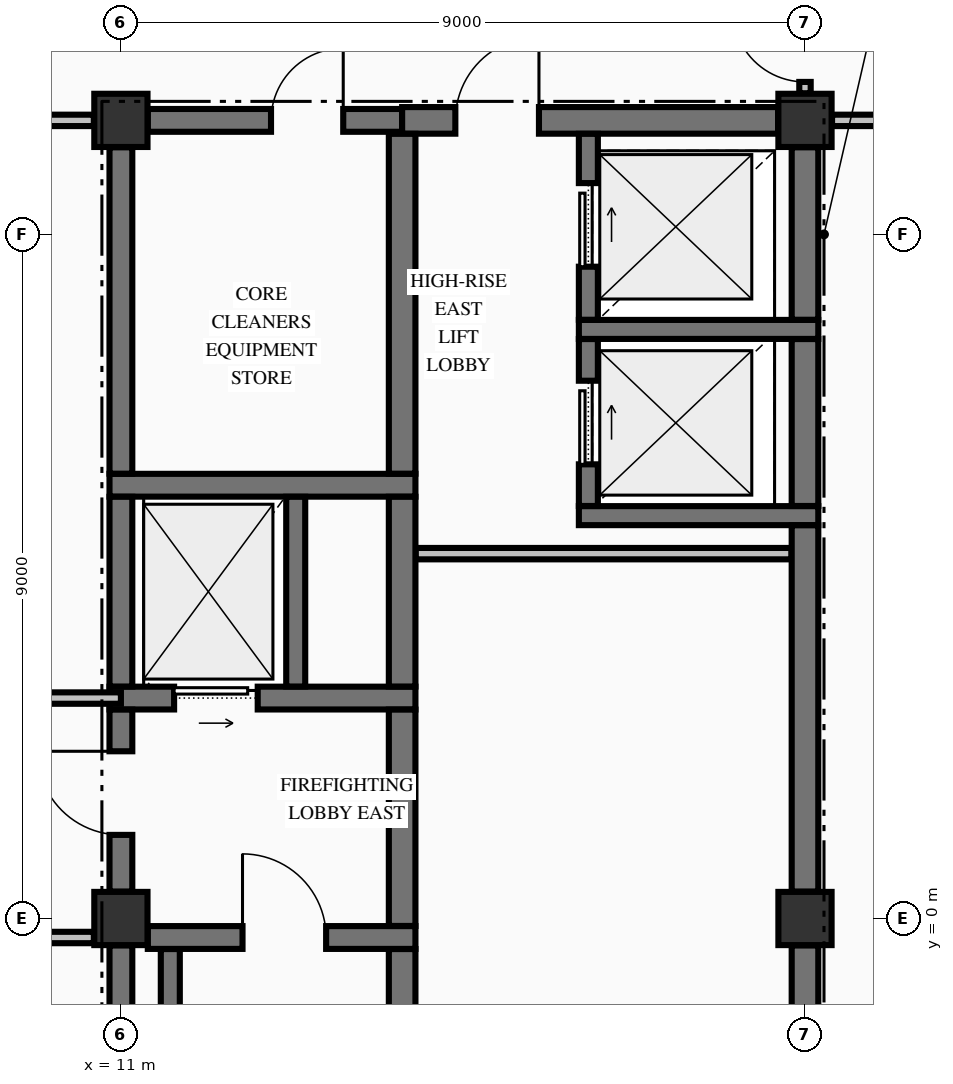
"""IFC4 building model, lengths in metres.
Left out: names, types, materials, properties, quantities, classifications, styles, units other than length and angle.
Written with IfcOpenShell. Run it as: python <this file> out.ifc"""

import sys

from ifc_helpers import new_model, si_unit, direction, frame, frame_2d, origin, origin_2d, place, context, subcontext, project, spatial, rectangle, extrude, element, fill, save


model = new_model("IFC4")
c1 = context("Model", 3, precision=1e-05, world=origin(), true_north=direction((0.0, 1.0)))
c2 = subcontext(c1, "Body", "Model", "MODEL_VIEW")
j1 = project(units=[si_unit("LENGTHUNIT", "METRE"), si_unit("PLANEANGLEUNIT", "RADIAN")], contexts=[c1])
p1 = place(None, origin())
s1 = spatial("IfcSite", under=j1, at=p1, CompositionType="ELEMENT")
p2 = place(p1, origin())
s2 = spatial("IfcBuilding", under=s1, at=p2, CompositionType="ELEMENT")
p3 = place(p2, frame((0.0, 0.0, 249.43)))
s3 = spatial("IfcBuildingStorey", under=s2, at=p3, CompositionType="ELEMENT", Elevation=249.43)
for number, where, z_axis, x_axis in (
    (1, (11.0, 0.0, -0.425), (0.0, 0.0, 1.0), (1.0, 0.0, 0.0)),
    (2, (11.0, 10.5, -0.425), (0.0, 0.0, 1.0), (1.0, 0.0, 0.0)),
    (3, (20.0, 10.5, -0.425), (0.0, 0.0, 1.0), (1.0, 0.0, 0.0)),
    (4, (20.0, 0.0, -0.425), (0.0, 0.0, 1.0), (1.0, 0.0, 0.0)),
):
    element("IfcColumn", number, at=place(p3, frame(where, z_axis=z_axis, x_axis=x_axis)), inside=s3, PredefinedType="COLUMN", context=c2, shape_type="SweptSolid", body=[
        extrude(rectangle(XDim=0.7, YDim=0.7, at=origin_2d()), origin(), (0.0, 0.0, 1.0), 5.0),
    ])
p4 = place(p3, frame((11.354, -0.25, 0.0), z_axis=(0.0, 0.0, 1.0), x_axis=(1.0, 0.0, 0.0)))
e5 = element("IfcWall", 5, at=p4, inside=s3, PredefinedType="SHEAR", context=c2, shape_type="SweptSolid", body=[
    extrude(rectangle(XDim=3.521, YDim=0.3, at=frame_2d((1.76, 0.0))), origin(), (0.0, 0.0, 1.0), 4.575),
])
p5 = place(p4, frame((1.246, 0.0, 0.0)))
e6 = element("IfcOpeningElement", 6, at=p5, cuts=e5, PredefinedType="OPENING", context=c2, shape_type="SweptSolid", body=[
    extrude(rectangle(XDim=1.1, YDim=2.15, at=frame_2d((0.55, 1.075))), frame((0.0, 0.16, 0.0), z_axis=(0.0, -1.0, 0.0), x_axis=(1.0, 0.0, 0.0)), (0.0, 0.0, 1.0), 0.32),
])
p6 = place(p3, frame((10.85, 2.9, 0.0), z_axis=(0.0, 0.0, 1.0), x_axis=(1.0, 0.0, 0.0)))
e7 = element("IfcWall", 7, at=p6, inside=s3, PredefinedType="SHEAR", context=c2, shape_type="SweptSolid", body=[
    extrude(rectangle(XDim=4.025, YDim=0.3, at=frame_2d((2.012, 0.0))), origin(), (0.0, 0.0, 1.0), 4.575),
])
p7 = place(p6, frame((0.85, 0.0, 0.0)))
e8 = element("IfcOpeningElement", 8, at=p7, cuts=e7, PredefinedType="OPENING", context=c2, shape_type="SweptSolid", body=[
    extrude(rectangle(XDim=1.1, YDim=2.2, at=frame_2d((0.55, 1.1))), frame((0.0, 0.16, 0.0), z_axis=(0.0, -1.0, 0.0), x_axis=(1.0, 0.0, 0.0)), (0.0, 0.0, 1.0), 0.32),
])
p8 = place(p3, frame((17.025, 5.3, 0.0), z_axis=(0.0, 0.0, 1.0), x_axis=(1.0, 0.0, 0.0)))
e9 = element("IfcWall", 9, at=p8, inside=s3, PredefinedType="SOLIDWALL", context=c2, shape_type="SweptSolid", body=[
    extrude(rectangle(XDim=3.15, YDim=0.25, at=frame_2d((1.575, 0.0))), origin(), (0.0, 0.0, 1.0), 4.575),
])
p9 = place(p3, frame((10.85, 5.7, 0.0), z_axis=(0.0, 0.0, 1.0), x_axis=(1.0, 0.0, 0.0)))
e10 = element("IfcWall", 10, at=p9, inside=s3, PredefinedType="SHEAR", context=c2, shape_type="SweptSolid", body=[
    extrude(rectangle(XDim=4.025, YDim=0.3, at=frame_2d((2.012, 0.0))), origin(), (0.0, 0.0, 1.0), 4.575),
])
p10 = place(p3, frame((17.025, 7.75, 0.0), z_axis=(0.0, 0.0, 1.0), x_axis=(1.0, 0.0, 0.0)))
e11 = element("IfcWall", 11, at=p10, inside=s3, PredefinedType="SOLIDWALL", context=c2, shape_type="SweptSolid", body=[
    extrude(rectangle(XDim=3.15, YDim=0.25, at=frame_2d((1.575, 0.0))), origin(), (0.0, 0.0, 1.0), 4.575),
])
p11 = place(p3, frame((11.354, 10.5, 0.0), z_axis=(0.0, 0.0, 1.0), x_axis=(1.0, 0.0, 0.0)))
e12 = element("IfcWall", 12, at=p11, inside=s3, PredefinedType="SHEAR", context=c2, shape_type="SweptSolid", body=[
    extrude(rectangle(XDim=3.346, YDim=0.3, at=frame_2d((1.673, 0.0))), origin(), (0.0, 0.0, 1.0), 4.575),
])
p12 = place(p11, frame((1.621, 0.0, 0.0)))
e13 = element("IfcOpeningElement", 13, at=p12, cuts=e12, PredefinedType="OPENING", context=c2, shape_type="SweptSolid", body=[
    extrude(rectangle(XDim=0.95, YDim=2.15, at=frame_2d((0.475, 1.075))), frame((0.0, 0.16, 0.0), z_axis=(0.0, -1.0, 0.0), x_axis=(1.0, 0.0, 0.0)), (0.0, 0.0, 1.0), 0.32),
])
p13 = place(p3, frame((14.7, 10.5, 0.0), z_axis=(0.0, 0.0, 1.0), x_axis=(1.0, 0.0, 0.0)))
e14 = element("IfcWall", 14, at=p13, inside=s3, PredefinedType="SHEAR", context=c2, shape_type="SweptSolid", body=[
    extrude(rectangle(XDim=4.946, YDim=0.35, at=frame_2d((2.473, 0.0))), origin(), (0.0, 0.0, 1.0), 4.575),
])
p14 = place(p13, frame((0.7, 0.0, 0.0)))
e15 = element("IfcOpeningElement", 15, at=p14, cuts=e14, PredefinedType="OPENING", context=c2, shape_type="SweptSolid", body=[
    extrude(rectangle(XDim=1.1, YDim=2.15, at=frame_2d((0.55, 1.075))), frame((0.0, 0.185, 0.0), z_axis=(0.0, -1.0, 0.0), x_axis=(1.0, 0.0, 0.0)), (0.0, 0.0, 1.0), 0.37),
])
p15 = place(p3, frame((-10.644, -0.25, 0.0), z_axis=(0.0, 0.0, 1.0), x_axis=(1.0, 0.0, 0.0)))
e16 = element("IfcWall", 16, at=p15, inside=s3, PredefinedType="PARTITIONING", context=c2, shape_type="SweptSolid", body=[
    extrude(rectangle(XDim=21.288, YDim=0.15, at=frame_2d((10.644, 0.0))), origin(), (0.0, 0.0, 1.0), 4.575),
])
p16 = place(p15, frame((13.544, 0.0, 0.0)))
e17 = element("IfcOpeningElement", 17, at=p16, cuts=e16, PredefinedType="OPENING", context=c2, shape_type="SweptSolid", body=[
    extrude(rectangle(XDim=1.1, YDim=2.15, at=frame_2d((0.55, 1.075))), frame((0.0, 0.085, 0.0), z_axis=(0.0, -1.0, 0.0), x_axis=(1.0, 0.0, 0.0)), (0.0, 0.0, 1.0), 0.17),
])
p17 = place(p15, frame((5.789, 0.0, 0.0)))
e18 = element("IfcOpeningElement", 18, at=p17, cuts=e16, PredefinedType="OPENING", context=c2, shape_type="SweptSolid", body=[
    extrude(rectangle(XDim=1.05, YDim=2.15, at=frame_2d((0.525, 1.075))), frame((0.0, 0.085, 0.0), z_axis=(0.0, -1.0, 0.0), x_axis=(1.0, 0.0, 0.0)), (0.0, 0.0, 1.0), 0.17),
])
p18 = place(p15, frame((17.949, 0.0, 0.0)))
e19 = element("IfcOpeningElement", 19, at=p18, cuts=e16, PredefinedType="OPENING", context=c2, shape_type="SweptSolid", body=[
    extrude(rectangle(XDim=0.95, YDim=2.15, at=frame_2d((0.475, 1.075))), frame((0.0, 0.085, 0.0), z_axis=(0.0, -1.0, 0.0), x_axis=(1.0, 0.0, 0.0)), (0.0, 0.0, 1.0), 0.17),
])
p19 = place(p3, frame((-11.0, 2.9, 0.0), z_axis=(0.0, 0.0, 1.0), x_axis=(1.0, 0.0, 0.0)))
e20 = element("IfcWall", 20, at=p19, inside=s3, PredefinedType="PARTITIONING", context=c2, shape_type="SweptSolid", body=[
    extrude(rectangle(XDim=22.0, YDim=0.15, at=frame_2d((11.0, 0.0))), origin(), (0.0, 0.0, 1.0), 4.575),
])
p20 = place(p19, frame((13.9, 0.0, 0.0)))
e21 = element("IfcOpeningElement", 21, at=p20, cuts=e20, PredefinedType="OPENING", context=c2, shape_type="SweptSolid", body=[
    extrude(rectangle(XDim=1.1, YDim=2.15, at=frame_2d((0.55, 1.075))), frame((0.0, 0.085, 0.0), z_axis=(0.0, -1.0, 0.0), x_axis=(1.0, 0.0, 0.0)), (0.0, 0.0, 1.0), 0.17),
])
p21 = place(p19, frame((6.145, 0.0, 0.0)))
e22 = element("IfcOpeningElement", 22, at=p21, cuts=e20, PredefinedType="OPENING", context=c2, shape_type="SweptSolid", body=[
    extrude(rectangle(XDim=1.05, YDim=2.15, at=frame_2d((0.525, 1.075))), frame((0.0, 0.085, 0.0), z_axis=(0.0, -1.0, 0.0), x_axis=(1.0, 0.0, 0.0)), (0.0, 0.0, 1.0), 0.17),
])
p22 = place(p19, frame((18.23, 0.0, 0.0)))
e23 = element("IfcOpeningElement", 23, at=p22, cuts=e20, PredefinedType="OPENING", context=c2, shape_type="SweptSolid", body=[
    extrude(rectangle(XDim=1.1, YDim=2.15, at=frame_2d((0.55, 1.075))), frame((0.0, 0.085, 0.0), z_axis=(0.0, -1.0, 0.0), x_axis=(1.0, 0.0, 0.0)), (0.0, 0.0, 1.0), 0.17),
])
p23 = place(p3, frame((14.878, 4.8, 0.0), z_axis=(0.0, 0.0, 1.0), x_axis=(1.0, 0.0, 0.0)))
e24 = element("IfcWall", 24, at=p23, inside=s3, PredefinedType="PARTITIONING", context=c2, shape_type="SweptSolid", body=[
    extrude(rectangle(XDim=4.944, YDim=0.15, at=frame_2d((2.472, 0.0))), origin(), (0.0, 0.0, 1.0), 4.575),
])
p24 = place(p3, frame((-10.644, 10.5, 0.0), z_axis=(0.0, 0.0, 1.0), x_axis=(1.0, 0.0, 0.0)))
e25 = element("IfcWall", 25, at=p24, inside=s3, PredefinedType="PARTITIONING", context=c2, shape_type="SweptSolid", body=[
    extrude(rectangle(XDim=21.288, YDim=0.15, at=frame_2d((10.644, 0.0))), origin(), (0.0, 0.0, 1.0), 4.575),
])
p25 = place(p24, frame((13.544, 0.0, 0.0)))
e26 = element("IfcOpeningElement", 26, at=p25, cuts=e25, PredefinedType="OPENING", context=c2, shape_type="SweptSolid", body=[
    extrude(rectangle(XDim=1.1, YDim=2.15, at=frame_2d((0.55, 1.075))), frame((0.0, 0.085, 0.0), z_axis=(0.0, -1.0, 0.0), x_axis=(1.0, 0.0, 0.0)), (0.0, 0.0, 1.0), 0.17),
])
p26 = place(p3, frame((20.356, 10.5, 0.0), z_axis=(0.0, 0.0, 1.0), x_axis=(1.0, 0.0, 0.0)))
e27 = element("IfcWall", 27, at=p26, inside=s3, PredefinedType="PARTITIONING", context=c2, shape_type="SweptSolid", body=[
    extrude(rectangle(XDim=5.479, YDim=0.15, at=frame_2d((2.74, 0.0))), origin(), (0.0, 0.0, 1.0), 4.575),
])
p27 = place(p26, frame((2.144, 0.0, 0.0)))
e28 = element("IfcOpeningElement", 28, at=p27, cuts=e27, PredefinedType="OPENING", context=c2, shape_type="SweptSolid", body=[
    extrude(rectangle(XDim=1.0, YDim=2.15, at=frame_2d((0.5, 1.075))), frame((0.0, 0.085, 0.0), z_axis=(0.0, -1.0, 0.0), x_axis=(1.0, 0.0, 0.0)), (0.0, 0.0, 1.0), 0.17),
])
p28 = place(p3, frame((11.0, -9.596, 0.0), z_axis=(0.0, 0.0, 1.0), x_axis=(0.0, 1.0, 0.0)))
e29 = element("IfcWall", 29, at=p28, inside=s3, PredefinedType="SHEAR", context=c2, shape_type="SweptSolid", body=[
    extrude(rectangle(XDim=9.242, YDim=0.3, at=frame_2d((4.621, 0.0))), origin(), (0.0, 0.0, 1.0), 4.575),
])
p29 = place(p3, frame((11.0, 0.354, 0.0), z_axis=(0.0, 0.0, 1.0), x_axis=(0.0, 1.0, 0.0)))
e30 = element("IfcWall", 30, at=p29, inside=s3, PredefinedType="SHEAR", context=c2, shape_type="SweptSolid", body=[
    extrude(rectangle(XDim=2.394, YDim=0.3, at=frame_2d((1.197, 0.0))), origin(), (0.0, 0.0, 1.0), 4.575),
])
p30 = place(p29, frame((0.746, 0.0, 0.0)))
e31 = element("IfcOpeningElement", 31, at=p30, cuts=e30, PredefinedType="OPENING", context=c2, shape_type="SweptSolid", body=[
    extrude(rectangle(XDim=1.1, YDim=2.15, at=frame_2d((0.55, 1.075))), frame((0.0, 0.16, 0.0), z_axis=(0.0, -1.0, 0.0), x_axis=(1.0, 0.0, 0.0)), (0.0, 0.0, 1.0), 0.32),
])
p31 = place(p3, frame((11.0, 3.052, 0.0), z_axis=(0.0, 0.0, 1.0), x_axis=(0.0, 1.0, 0.0)))
e32 = element("IfcWall", 32, at=p31, inside=s3, PredefinedType="SHEAR", context=c2, shape_type="SweptSolid", body=[
    extrude(rectangle(XDim=2.496, YDim=0.3, at=frame_2d((1.248, 0.0))), origin(), (0.0, 0.0, 1.0), 4.575),
])
p32 = place(p3, frame((11.0, 5.852, 0.0), z_axis=(0.0, 0.0, 1.0), x_axis=(0.0, 1.0, 0.0)))
e33 = element("IfcWall", 33, at=p32, inside=s3, PredefinedType="SHEAR", context=c2, shape_type="SweptSolid", body=[
    extrude(rectangle(XDim=4.294, YDim=0.3, at=frame_2d((2.147, 0.0))), origin(), (0.0, 0.0, 1.0), 4.575),
])
p33 = place(p3, frame((11.65, -9.798, 0.0), z_axis=(0.0, 0.0, 1.0), x_axis=(0.0, 1.0, 0.0)))
e34 = element("IfcWall", 34, at=p33, inside=s3, PredefinedType="SOLIDWALL", context=c2, shape_type="SweptSolid", body=[
    extrude(rectangle(XDim=9.396, YDim=0.25, at=frame_2d((4.698, 0.0))), origin(), (0.0, 0.0, 1.0), 4.575),
])
p34 = place(p3, frame((13.3, 3.052, 0.0), z_axis=(0.0, 0.0, 1.0), x_axis=(0.0, 1.0, 0.0)))
e35 = element("IfcWall", 35, at=p34, inside=s3, PredefinedType="SOLIDWALL", context=c2, shape_type="SweptSolid", body=[
    extrude(rectangle(XDim=2.496, YDim=0.25, at=frame_2d((1.248, 0.0))), origin(), (0.0, 0.0, 1.0), 4.575),
])
p35 = place(p3, frame((14.7, -9.773, 0.0), z_axis=(0.0, 0.0, 1.0), x_axis=(0.0, 1.0, 0.0)))
e36 = element("IfcWall", 36, at=p35, inside=s3, PredefinedType="SHEAR", context=c2, shape_type="SweptSolid", body=[
    extrude(rectangle(XDim=9.371, YDim=0.35, at=frame_2d((4.686, 0.0))), origin(), (0.0, 0.0, 1.0), 4.575),
])
p36 = place(p3, frame((14.7, -0.098, 0.0), z_axis=(0.0, 0.0, 1.0), x_axis=(0.0, 1.0, 0.0)))
e37 = element("IfcWall", 37, at=p36, inside=s3, PredefinedType="SHEAR", context=c2, shape_type="SweptSolid", body=[
    extrude(rectangle(XDim=2.846, YDim=0.35, at=frame_2d((1.423, 0.0))), origin(), (0.0, 0.0, 1.0), 4.575),
])
p37 = place(p3, frame((14.7, 3.052, 0.0), z_axis=(0.0, 0.0, 1.0), x_axis=(0.0, 1.0, 0.0)))
e38 = element("IfcWall", 38, at=p37, inside=s3, PredefinedType="SHEAR", context=c2, shape_type="SweptSolid", body=[
    extrude(rectangle(XDim=2.496, YDim=0.35, at=frame_2d((1.248, 0.0))), origin(), (0.0, 0.0, 1.0), 4.575),
])
p38 = place(p3, frame((14.7, 5.852, 0.0), z_axis=(0.0, 0.0, 1.0), x_axis=(0.0, 1.0, 0.0)))
e39 = element("IfcWall", 39, at=p38, inside=s3, PredefinedType="SHEAR", context=c2, shape_type="SweptSolid", body=[
    extrude(rectangle(XDim=4.471, YDim=0.35, at=frame_2d((2.235, 0.0))), origin(), (0.0, 0.0, 1.0), 4.575),
])
p39 = place(p3, frame((17.15, 5.427, 0.0), z_axis=(0.0, 0.0, 1.0), x_axis=(0.0, 1.0, 0.0)))
e40 = element("IfcWall", 40, at=p39, inside=s3, PredefinedType="SOLIDWALL", context=c2, shape_type="SweptSolid", body=[
    extrude(rectangle(XDim=2.196, YDim=0.25, at=frame_2d((1.098, 0.0))), origin(), (0.0, 0.0, 1.0), 4.575),
])
p40 = place(p39, frame((0.548, 0.0, 0.0)))
e41 = element("IfcOpeningElement", 41, at=p40, cuts=e40, PredefinedType="OPENING", context=c2, shape_type="SweptSolid", body=[
    extrude(rectangle(XDim=1.1, YDim=2.2, at=frame_2d((0.55, 1.1))), frame((0.0, 0.135, 0.0), z_axis=(0.0, -1.0, 0.0), x_axis=(1.0, 0.0, 0.0)), (0.0, 0.0, 1.0), 0.27),
])
p41 = place(p3, frame((17.15, 7.877, 0.0), z_axis=(0.0, 0.0, 1.0), x_axis=(0.0, 1.0, 0.0)))
e42 = element("IfcWall", 42, at=p41, inside=s3, PredefinedType="SOLIDWALL", context=c2, shape_type="SweptSolid", body=[
    extrude(rectangle(XDim=2.446, YDim=0.25, at=frame_2d((1.223, 0.0))), origin(), (0.0, 0.0, 1.0), 4.575),
])
p42 = place(p41, frame((0.698, 0.0, 0.0)))
e43 = element("IfcOpeningElement", 43, at=p42, cuts=e42, PredefinedType="OPENING", context=c2, shape_type="SweptSolid", body=[
    extrude(rectangle(XDim=1.1, YDim=2.2, at=frame_2d((0.55, 1.1))), frame((0.0, 0.135, 0.0), z_axis=(0.0, -1.0, 0.0), x_axis=(1.0, 0.0, 0.0)), (0.0, 0.0, 1.0), 0.27),
])
p43 = place(p3, frame((20.0, -9.596, 0.0), z_axis=(0.0, 0.0, 1.0), x_axis=(0.0, 1.0, 0.0)))
e44 = element("IfcWall", 44, at=p43, inside=s3, PredefinedType="SHEAR", context=c2, shape_type="SweptSolid", body=[
    extrude(rectangle(XDim=9.242, YDim=0.35, at=frame_2d((4.621, 0.0))), origin(), (0.0, 0.0, 1.0), 4.575),
])
p44 = place(p3, frame((20.0, 0.354, 0.0), z_axis=(0.0, 0.0, 1.0), x_axis=(0.0, 1.0, 0.0)))
e45 = element("IfcWall", 45, at=p44, inside=s3, PredefinedType="SHEAR", context=c2, shape_type="SweptSolid", body=[
    extrude(rectangle(XDim=4.819, YDim=0.35, at=frame_2d((2.41, 0.0))), origin(), (0.0, 0.0, 1.0), 4.575),
])
p45 = place(p3, frame((20.0, 5.427, 0.0), z_axis=(0.0, 0.0, 1.0), x_axis=(0.0, 1.0, 0.0)))
e46 = element("IfcWall", 46, at=p45, inside=s3, PredefinedType="SHEAR", context=c2, shape_type="SweptSolid", body=[
    extrude(rectangle(XDim=2.196, YDim=0.35, at=frame_2d((1.098, 0.0))), origin(), (0.0, 0.0, 1.0), 4.575),
])
p46 = place(p3, frame((20.0, 7.877, 0.0), z_axis=(0.0, 0.0, 1.0), x_axis=(0.0, 1.0, 0.0)))
e47 = element("IfcWall", 47, at=p46, inside=s3, PredefinedType="SHEAR", context=c2, shape_type="SweptSolid", body=[
    extrude(rectangle(XDim=2.269, YDim=0.35, at=frame_2d((1.135, 0.0))), origin(), (0.0, 0.0, 1.0), 4.575),
])
p47 = place(p3, frame((20.0, 10.856, 0.0), z_axis=(0.0, 0.0, 1.0), x_axis=(0.0, 1.0, 0.0)))
e48 = element("IfcWall", 48, at=p47, inside=s3, PredefinedType="PARTITIONING", context=c2, shape_type="SweptSolid", body=[
    extrude(rectangle(XDim=1.416, YDim=0.15, at=frame_2d((0.708, 0.0))), origin(), (0.0, 0.0, 1.0), 4.575),
])
p48 = place(p47, frame((0.15, 0.0, 0.0)))
e49 = element("IfcOpeningElement", 49, at=p48, cuts=e48, PredefinedType="OPENING", context=c2, shape_type="SweptSolid", body=[
    extrude(rectangle(XDim=0.95, YDim=2.02, at=frame_2d((0.475, 1.01))), frame((0.0, 0.085, 0.0), z_axis=(0.0, -1.0, 0.0), x_axis=(1.0, 0.0, 0.0)), (0.0, 0.0, 1.0), 0.17),
])
p49 = place(p5, origin())
e50 = element("IfcDoor", 50, at=p49, inside=s3, OperationType="SINGLE_SWING_LEFT", PredefinedType="DOOR", context=c2, shape_type="SweptSolid", body=[
    extrude(rectangle(XDim=1.1, YDim=2.15, at=frame_2d((0.55, 1.075))), frame((0.0, 0.025, 0.0), z_axis=(0.0, -1.0, 0.0), x_axis=(1.0, 0.0, 0.0)), (0.0, 0.0, 1.0), 0.05),
])
fill(e6, e50)
p50 = place(p30, origin())
e51 = element("IfcDoor", 51, at=p50, inside=s3, OperationType="SINGLE_SWING_RIGHT", PredefinedType="DOOR", context=c2, shape_type="SweptSolid", body=[
    extrude(rectangle(XDim=1.1, YDim=2.15, at=frame_2d((0.55, 1.075))), frame((0.0, 0.025, 0.0), z_axis=(0.0, -1.0, 0.0), x_axis=(1.0, 0.0, 0.0)), (0.0, 0.0, 1.0), 0.05),
])
fill(e31, e51)
p51 = place(p7, origin())
e52 = element("IfcDoor", 52, at=p51, inside=s3, OperationType="SLIDING_TO_RIGHT", PredefinedType="DOOR", context=c2, shape_type="SweptSolid", body=[
    extrude(rectangle(XDim=1.1, YDim=2.2, at=frame_2d((0.55, 1.1))), frame((0.0, 0.025, 0.0), z_axis=(0.0, -1.0, 0.0), x_axis=(1.0, 0.0, 0.0)), (0.0, 0.0, 1.0), 0.05),
])
fill(e8, e52)
p52 = place(p12, origin())
e53 = element("IfcDoor", 53, at=p52, inside=s3, OperationType="SINGLE_SWING_RIGHT", PredefinedType="DOOR", context=c2, shape_type="SweptSolid", body=[
    extrude(rectangle(XDim=0.95, YDim=2.15, at=frame_2d((0.475, 1.075))), frame((0.0, 0.025, 0.0), z_axis=(0.0, -1.0, 0.0), x_axis=(1.0, 0.0, 0.0)), (0.0, 0.0, 1.0), 0.05),
])
fill(e13, e53)
p53 = place(p40, origin())
e54 = element("IfcDoor", 54, at=p53, inside=s3, OperationType="SLIDING_TO_RIGHT", PredefinedType="DOOR", context=c2, shape_type="SweptSolid", body=[
    extrude(rectangle(XDim=1.1, YDim=2.2, at=frame_2d((0.55, 1.1))), frame((0.0, 0.025, 0.0), z_axis=(0.0, -1.0, 0.0), x_axis=(1.0, 0.0, 0.0)), (0.0, 0.0, 1.0), 0.05),
])
fill(e41, e54)
p54 = place(p42, origin())
e55 = element("IfcDoor", 55, at=p54, inside=s3, OperationType="SLIDING_TO_RIGHT", PredefinedType="DOOR", context=c2, shape_type="SweptSolid", body=[
    extrude(rectangle(XDim=1.1, YDim=2.2, at=frame_2d((0.55, 1.1))), frame((0.0, 0.025, 0.0), z_axis=(0.0, -1.0, 0.0), x_axis=(1.0, 0.0, 0.0)), (0.0, 0.0, 1.0), 0.05),
])
fill(e43, e55)
p55 = place(p14, origin())
e56 = element("IfcDoor", 56, at=p55, inside=s3, OperationType="SINGLE_SWING_RIGHT", PredefinedType="DOOR", context=c2, shape_type="SweptSolid", body=[
    extrude(rectangle(XDim=1.1, YDim=2.15, at=frame_2d((0.55, 1.075))), frame((0.0, 0.025, 0.0), z_axis=(0.0, -1.0, 0.0), x_axis=(1.0, 0.0, 0.0)), (0.0, 0.0, 1.0), 0.05),
])
fill(e15, e56)
p56 = place(p48, origin())
e57 = element("IfcDoor", 57, at=p56, inside=s3, OperationType="SINGLE_SWING_RIGHT", PredefinedType="DOOR", context=c2, shape_type="SweptSolid", body=[
    extrude(rectangle(XDim=0.95, YDim=2.02, at=frame_2d((0.475, 1.01))), frame((0.0, 0.025, 0.0), z_axis=(0.0, -1.0, 0.0), x_axis=(1.0, 0.0, 0.0)), (0.0, 0.0, 1.0), 0.05),
])
fill(e49, e57)
save(model, sys.argv[1])
